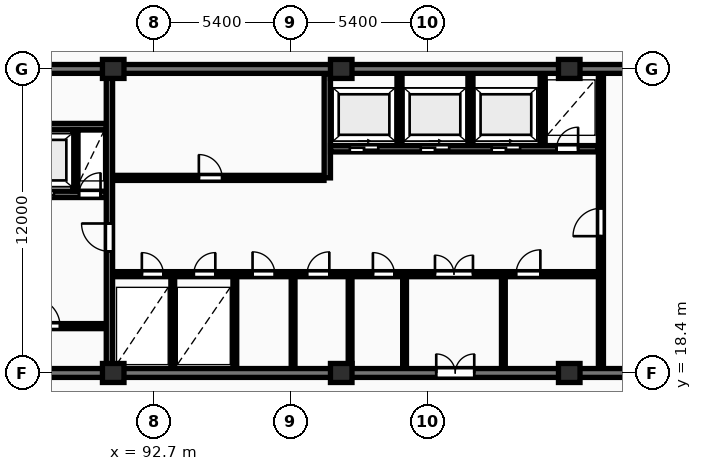
"""IFC4 building model, lengths in metres.
Left out: names, types, materials, properties, quantities, classifications, styles, units other than length and angle.
Written with IfcOpenShell. Run it as: python <this file> out.ifc"""

import sys

from ifc_helpers import new_model, si_unit, direction, frame, frame_2d, origin, origin_2d, place, context, subcontext, project, spatial, rectangle, extrude, element, fill, save


model = new_model("IFC4")
c1 = context("Model", 3, precision=1e-05, world=origin(), true_north=direction((0.0, 1.0)))
c2 = subcontext(c1, "Body", "Model", "MODEL_VIEW")
j1 = project(units=[si_unit("LENGTHUNIT", "METRE"), si_unit("PLANEANGLEUNIT", "RADIAN")], contexts=[c1])
p1 = place(None, origin())
s1 = spatial("IfcSite", under=j1, at=p1, CompositionType="ELEMENT")
p2 = place(p1, origin())
s2 = spatial("IfcBuilding", under=s1, at=p2, CompositionType="ELEMENT")
p3 = place(p2, frame((0.0, 0.0, 106.8)))
s3 = spatial("IfcBuildingStorey", under=s2, at=p3, CompositionType="ELEMENT", Elevation=106.8)
for number, where, z_axis, x_axis in (
    (1, (91.1, 18.4, 0.0), (0.0, 0.0, 1.0), (1.0, 0.0, 0.0)),
    (2, (91.1, 30.4, 0.0), (0.0, 0.0, 1.0), (1.0, 0.0, 0.0)),
    (3, (100.1, 18.4, 0.0), (0.0, 0.0, 1.0), (1.0, 0.0, 0.0)),
    (4, (100.1, 30.4, 0.0), (0.0, 0.0, 1.0), (1.0, 0.0, 0.0)),
    (5, (109.1, 18.4, 0.0), (0.0, 0.0, 1.0), (1.0, 0.0, 0.0)),
    (6, (109.1, 30.4, 0.0), (0.0, 0.0, 1.0), (1.0, 0.0, 0.0)),
):
    element("IfcColumn", number, at=place(p3, frame(where, z_axis=z_axis, x_axis=x_axis)), inside=s3, PredefinedType="COLUMN", context=c2, shape_type="SweptSolid", body=[
        extrude(rectangle(XDim=0.85, YDim=0.75, at=origin_2d()), origin(), (0.0, 0.0, 1.0), 3.25),
    ])
p4 = place(p3, frame((81.925, 30.4, 0.0), z_axis=(0.0, 0.0, 1.0), x_axis=(1.0, 0.0, 0.0)))
e7 = element("IfcWall", 7, at=p4, inside=s3, PredefinedType="SHEAR", context=c2, shape_type="SweptSolid", body=[
    extrude(rectangle(XDim=36.265, YDim=0.35, at=frame_2d((18.132, 0.0))), origin(), (0.0, 0.0, 1.0), 3.25),
])
p5 = place(p3, frame((81.925, 18.4, 0.0), z_axis=(0.0, 0.0, 1.0), x_axis=(1.0, 0.0, 0.0)))
e8 = element("IfcWall", 8, at=p5, inside=s3, PredefinedType="SHEAR", context=c2, shape_type="SweptSolid", body=[
    extrude(rectangle(XDim=36.265, YDim=0.35, at=frame_2d((18.132, 0.0))), origin(), (0.0, 0.0, 1.0), 3.25),
])
p6 = place(p5, frame((5.675, 0.0, 0.0)))
e9 = element("IfcOpeningElement", 9, at=p6, cuts=e8, PredefinedType="OPENING", context=c2, shape_type="SweptSolid", body=[
    extrude(rectangle(XDim=1.0, YDim=2.15, at=frame_2d((0.5, 1.075))), frame((0.0, 0.185, 0.0), z_axis=(0.0, -1.0, 0.0), x_axis=(1.0, 0.0, 0.0)), (0.0, 0.0, 1.0), 0.37),
])
p7 = place(p5, frame((21.925, 0.0, 0.0)))
e10 = element("IfcOpeningElement", 10, at=p7, cuts=e8, PredefinedType="OPENING", context=c2, shape_type="SweptSolid", body=[
    extrude(rectangle(XDim=1.5, YDim=2.2, at=frame_2d((0.75, 1.1))), frame((0.0, 0.185, 0.0), z_axis=(0.0, -1.0, 0.0), x_axis=(1.0, 0.0, 0.0)), (0.0, 0.0, 1.0), 0.37),
])
p8 = place(p5, frame((29.875, 0.0, 0.0)))
e11 = element("IfcOpeningElement", 11, at=p8, cuts=e8, PredefinedType="OPENING", context=c2, shape_type="SweptSolid", body=[
    extrude(rectangle(XDim=1.0, YDim=2.15, at=frame_2d((0.5, 1.075))), frame((0.0, 0.185, 0.0), z_axis=(0.0, -1.0, 0.0), x_axis=(1.0, 0.0, 0.0)), (0.0, 0.0, 1.0), 0.37),
])
p9 = place(p3, frame((83.0, 28.125, 0.0), z_axis=(0.0, 0.0, 1.0), x_axis=(1.0, 0.0, 0.0)))
e12 = element("IfcWall", 12, at=p9, inside=s3, PredefinedType="SHEAR", context=c2, shape_type="SweptSolid", body=[
    extrude(rectangle(XDim=7.82, YDim=0.25, at=frame_2d((3.91, 0.0))), origin(), (0.0, 0.0, 1.0), 3.25),
])
p10 = place(p3, frame((86.5, 25.45, 0.0), z_axis=(0.0, 0.0, 1.0), x_axis=(1.0, 0.0, 0.0)))
e13 = element("IfcWall", 13, at=p10, inside=s3, PredefinedType="SHEAR", context=c2, shape_type="SweptSolid", body=[
    extrude(rectangle(XDim=4.32, YDim=0.25, at=frame_2d((2.16, 0.0))), origin(), (0.0, 0.0, 1.0), 3.25),
])
p11 = place(p10, frame((1.14, 0.0, 0.0)))
e14 = element("IfcOpeningElement", 14, at=p11, cuts=e13, PredefinedType="OPENING", context=c2, shape_type="SweptSolid", body=[
    extrude(rectangle(XDim=1.12, YDim=2.12, at=frame_2d((0.56, 1.06))), frame((0.0, 0.135, 0.0), z_axis=(0.0, -1.0, 0.0), x_axis=(1.0, 0.0, 0.0)), (0.0, 0.0, 1.0), 0.27),
])
p12 = place(p10, frame((3.25, 0.0, 0.0)))
e15 = element("IfcOpeningElement", 15, at=p12, cuts=e13, PredefinedType="OPENING", context=c2, shape_type="SweptSolid", body=[
    extrude(rectangle(XDim=0.85, YDim=2.05, at=frame_2d((0.425, 1.025))), frame((0.0, 0.135, 0.0), z_axis=(0.0, -1.0, 0.0), x_axis=(1.0, 0.0, 0.0)), (0.0, 0.0, 1.0), 0.27),
])
p13 = place(p3, frame((89.6, 25.58, 0.0), z_axis=(0.0, 0.0, 1.0), x_axis=(0.0, 1.0, 0.0)))
e16 = element("IfcWall", 16, at=p13, inside=s3, PredefinedType="PARTITIONING", context=c2, shape_type="SweptSolid", body=[
    extrude(rectangle(XDim=2.42, YDim=0.2, at=frame_2d((1.21, 0.0))), origin(), (0.0, 0.0, 1.0), 2.97),
])
p14 = place(p3, frame((86.5, 20.25, 0.0), z_axis=(0.0, 0.0, 1.0), x_axis=(1.0, 0.0, 0.0)))
e17 = element("IfcWall", 17, at=p14, inside=s3, PredefinedType="PARTITIONING", context=c2, shape_type="SweptSolid", body=[
    extrude(rectangle(XDim=4.32, YDim=0.2, at=frame_2d((2.16, 0.0))), origin(), (0.0, 0.0, 1.0), 2.97),
])
p15 = place(p14, frame((1.4, 0.0, 0.0)))
e18 = element("IfcOpeningElement", 18, at=p15, cuts=e17, PredefinedType="OPENING", context=c2, shape_type="SweptSolid", body=[
    extrude(rectangle(XDim=1.1, YDim=2.1, at=frame_2d((0.55, 1.05))), frame((0.0, 0.11, 0.0), z_axis=(0.0, -1.0, 0.0), x_axis=(1.0, 0.0, 0.0)), (0.0, 0.0, 1.0), 0.22),
])
p16 = place(p3, frame((90.95, 18.6, 0.0), z_axis=(0.0, 0.0, 1.0), x_axis=(0.0, 1.0, 0.0)))
e19 = element("IfcWall", 19, at=p16, inside=s3, PredefinedType="SHEAR", context=c2, shape_type="SweptSolid", body=[
    extrude(rectangle(XDim=11.6, YDim=0.25, at=frame_2d((5.8, 0.0))), origin(), (0.0, 0.0, 1.0), 3.25),
])
p17 = place(p16, frame((4.6, 0.0, 0.0)))
e20 = element("IfcOpeningElement", 20, at=p17, cuts=e19, PredefinedType="OPENING", context=c2, shape_type="SweptSolid", body=[
    extrude(rectangle(XDim=1.1, YDim=2.1, at=frame_2d((0.55, 1.05))), frame((0.0, 0.135, 0.0), z_axis=(0.0, -1.0, 0.0), x_axis=(1.0, 0.0, 0.0)), (0.0, 0.0, 1.0), 0.27),
])
p18 = place(p3, frame((91.08, 26.1, 0.0), z_axis=(0.0, 0.0, 1.0), x_axis=(1.0, 0.0, 0.0)))
e21 = element("IfcWall", 21, at=p18, inside=s3, PredefinedType="PARTITIONING", context=c2, shape_type="SweptSolid", body=[
    extrude(rectangle(XDim=8.34, YDim=0.2, at=frame_2d((4.17, 0.0))), origin(), (0.0, 0.0, 1.0), 2.97),
])
p19 = place(p18, frame((3.4, 0.0, 0.0)))
e22 = element("IfcOpeningElement", 22, at=p19, cuts=e21, PredefinedType="OPENING", context=c2, shape_type="SweptSolid", body=[
    extrude(rectangle(XDim=0.92, YDim=2.08, at=frame_2d((0.46, 1.04))), frame((0.0, 0.11, 0.0), z_axis=(0.0, -1.0, 0.0), x_axis=(1.0, 0.0, 0.0)), (0.0, 0.0, 1.0), 0.22),
])
p20 = place(p3, frame((99.55, 26.1, 0.0), z_axis=(0.0, 0.0, 1.0), x_axis=(0.0, 1.0, 0.0)))
e23 = element("IfcWall", 23, at=p20, inside=s3, PredefinedType="SHEAR", context=c2, shape_type="SweptSolid", body=[
    extrude(rectangle(XDim=4.1, YDim=0.25, at=frame_2d((2.05, 0.0))), origin(), (0.0, 0.0, 1.0), 3.25),
])
for number, where, z_axis, x_axis in (
    (24, (102.4, 27.38, 0.0), (0.0, 0.0, 1.0), (0.0, 1.0, 0.0)),
    (25, (105.2, 27.38, 0.0), (0.0, 0.0, 1.0), (0.0, 1.0, 0.0)),
    (26, (108.05, 27.38, 0.0), (0.0, 0.0, 1.0), (0.0, 1.0, 0.0)),
):
    element("IfcWall", number, at=place(p3, frame(where, z_axis=z_axis, x_axis=x_axis)), inside=s3, PredefinedType="PARTITIONING", context=c2, shape_type="SweptSolid", body=[
        extrude(rectangle(XDim=2.82, YDim=0.2, at=frame_2d((1.41, 0.0))), origin(), (0.0, 0.0, 1.0), 2.97),
    ])
p21 = place(p3, frame((99.68, 27.25, 0.0), z_axis=(0.0, 0.0, 1.0), x_axis=(1.0, 0.0, 0.0)))
e27 = element("IfcWall", 27, at=p21, inside=s3, PredefinedType="SHEAR", context=c2, shape_type="SweptSolid", body=[
    extrude(rectangle(XDim=10.54, YDim=0.25, at=frame_2d((5.27, 0.0))), origin(), (0.0, 0.0, 1.0), 3.25),
])
p22 = place(p21, frame((0.76, 0.0, 0.0)))
e28 = element("IfcOpeningElement", 28, at=p22, cuts=e27, PredefinedType="OPENING", context=c2, shape_type="SweptSolid", body=[
    extrude(rectangle(XDim=1.12, YDim=2.12, at=frame_2d((0.56, 1.06))), frame((0.0, 0.135, 0.0), z_axis=(0.0, -1.0, 0.0), x_axis=(1.0, 0.0, 0.0)), (0.0, 0.0, 1.0), 0.27),
])
p23 = place(p21, frame((3.56, 0.0, 0.0)))
e29 = element("IfcOpeningElement", 29, at=p23, cuts=e27, PredefinedType="OPENING", context=c2, shape_type="SweptSolid", body=[
    extrude(rectangle(XDim=1.12, YDim=2.12, at=frame_2d((0.56, 1.06))), frame((0.0, 0.135, 0.0), z_axis=(0.0, -1.0, 0.0), x_axis=(1.0, 0.0, 0.0)), (0.0, 0.0, 1.0), 0.27),
])
p24 = place(p21, frame((6.36, 0.0, 0.0)))
e30 = element("IfcOpeningElement", 30, at=p24, cuts=e27, PredefinedType="OPENING", context=c2, shape_type="SweptSolid", body=[
    extrude(rectangle(XDim=1.12, YDim=2.12, at=frame_2d((0.56, 1.06))), frame((0.0, 0.135, 0.0), z_axis=(0.0, -1.0, 0.0), x_axis=(1.0, 0.0, 0.0)), (0.0, 0.0, 1.0), 0.27),
])
p25 = place(p21, frame((8.92, 0.0, 0.0)))
e31 = element("IfcOpeningElement", 31, at=p25, cuts=e27, PredefinedType="OPENING", context=c2, shape_type="SweptSolid", body=[
    extrude(rectangle(XDim=0.85, YDim=2.05, at=frame_2d((0.425, 1.025))), frame((0.0, 0.135, 0.0), z_axis=(0.0, -1.0, 0.0), x_axis=(1.0, 0.0, 0.0)), (0.0, 0.0, 1.0), 0.27),
])
for number, where, z_axis, x_axis in (
    (32, (93.45, 18.6, 0.0), (0.0, 0.0, 1.0), (0.0, 1.0, 0.0)),
    (33, (95.9, 18.6, 0.0), (0.0, 0.0, 1.0), (0.0, 1.0, 0.0)),
    (34, (98.2, 18.6, 0.0), (0.0, 0.0, 1.0), (0.0, 1.0, 0.0)),
    (35, (100.45, 18.6, 0.0), (0.0, 0.0, 1.0), (0.0, 1.0, 0.0)),
    (36, (102.6, 18.6, 0.0), (0.0, 0.0, 1.0), (0.0, 1.0, 0.0)),
    (37, (106.5, 18.6, 0.0), (0.0, 0.0, 1.0), (0.0, 1.0, 0.0)),
):
    element("IfcWall", number, at=place(p3, frame(where, z_axis=z_axis, x_axis=x_axis)), inside=s3, PredefinedType="PARTITIONING", context=c2, shape_type="SweptSolid", body=[
        extrude(rectangle(XDim=3.6, YDim=0.15, at=frame_2d((1.8, 0.0))), origin(), (0.0, 0.0, 1.0), 2.97),
    ])
p26 = place(p3, frame((91.08, 22.3, 0.0), z_axis=(0.0, 0.0, 1.0), x_axis=(1.0, 0.0, 0.0)))
e38 = element("IfcWall", 38, at=p26, inside=s3, PredefinedType="PARTITIONING", context=c2, shape_type="SweptSolid", body=[
    extrude(rectangle(XDim=19.14, YDim=0.2, at=frame_2d((9.57, 0.0))), origin(), (0.0, 0.0, 1.0), 2.97),
])
p27 = place(p26, frame((1.15, 0.0, 0.0)))
e39 = element("IfcOpeningElement", 39, at=p27, cuts=e38, PredefinedType="OPENING", context=c2, shape_type="SweptSolid", body=[
    extrude(rectangle(XDim=0.85, YDim=2.05, at=frame_2d((0.425, 1.025))), frame((0.0, 0.11, 0.0), z_axis=(0.0, -1.0, 0.0), x_axis=(1.0, 0.0, 0.0)), (0.0, 0.0, 1.0), 0.22),
])
p28 = place(p26, frame((3.2, 0.0, 0.0)))
e40 = element("IfcOpeningElement", 40, at=p28, cuts=e38, PredefinedType="OPENING", context=c2, shape_type="SweptSolid", body=[
    extrude(rectangle(XDim=0.85, YDim=2.05, at=frame_2d((0.425, 1.025))), frame((0.0, 0.11, 0.0), z_axis=(0.0, -1.0, 0.0), x_axis=(1.0, 0.0, 0.0)), (0.0, 0.0, 1.0), 0.22),
])
p29 = place(p26, frame((12.72, 0.0, 0.0)))
e41 = element("IfcOpeningElement", 41, at=p29, cuts=e38, PredefinedType="OPENING", context=c2, shape_type="SweptSolid", body=[
    extrude(rectangle(XDim=1.5, YDim=2.2, at=frame_2d((0.75, 1.1))), frame((0.0, 0.11, 0.0), z_axis=(0.0, -1.0, 0.0), x_axis=(1.0, 0.0, 0.0)), (0.0, 0.0, 1.0), 0.22),
])
p30 = place(p26, frame((5.52, 0.0, 0.0)))
e42 = element("IfcOpeningElement", 42, at=p30, cuts=e38, PredefinedType="OPENING", context=c2, shape_type="SweptSolid", body=[
    extrude(rectangle(XDim=0.88, YDim=2.06, at=frame_2d((0.44, 1.03))), frame((0.0, 0.11, 0.0), z_axis=(0.0, -1.0, 0.0), x_axis=(1.0, 0.0, 0.0)), (0.0, 0.0, 1.0), 0.22),
])
p31 = place(p26, frame((7.67, 0.0, 0.0)))
e43 = element("IfcOpeningElement", 43, at=p31, cuts=e38, PredefinedType="OPENING", context=c2, shape_type="SweptSolid", body=[
    extrude(rectangle(XDim=0.88, YDim=2.06, at=frame_2d((0.44, 1.03))), frame((0.0, 0.11, 0.0), z_axis=(0.0, -1.0, 0.0), x_axis=(1.0, 0.0, 0.0)), (0.0, 0.0, 1.0), 0.22),
])
p32 = place(p26, frame((10.27, 0.0, 0.0)))
e44 = element("IfcOpeningElement", 44, at=p32, cuts=e38, PredefinedType="OPENING", context=c2, shape_type="SweptSolid", body=[
    extrude(rectangle(XDim=0.85, YDim=2.05, at=frame_2d((0.425, 1.025))), frame((0.0, 0.11, 0.0), z_axis=(0.0, -1.0, 0.0), x_axis=(1.0, 0.0, 0.0)), (0.0, 0.0, 1.0), 0.22),
])
p33 = place(p26, frame((15.92, 0.0, 0.0)))
e45 = element("IfcOpeningElement", 45, at=p33, cuts=e38, PredefinedType="OPENING", context=c2, shape_type="SweptSolid", body=[
    extrude(rectangle(XDim=0.96, YDim=2.1, at=frame_2d((0.48, 1.05))), frame((0.0, 0.11, 0.0), z_axis=(0.0, -1.0, 0.0), x_axis=(1.0, 0.0, 0.0)), (0.0, 0.0, 1.0), 0.22),
])
p34 = place(p3, frame((110.35, 18.6, 0.0), z_axis=(0.0, 0.0, 1.0), x_axis=(0.0, 1.0, 0.0)))
e46 = element("IfcWall", 46, at=p34, inside=s3, PredefinedType="PARTITIONING", context=c2, shape_type="SweptSolid", body=[
    extrude(rectangle(XDim=11.6, YDim=0.2, at=frame_2d((5.8, 0.0))), origin(), (0.0, 0.0, 1.0), 2.97),
])
p35 = place(p34, frame((5.2, 0.0, 0.0)))
e47 = element("IfcOpeningElement", 47, at=p35, cuts=e46, PredefinedType="OPENING", context=c2, shape_type="SweptSolid", body=[
    extrude(rectangle(XDim=1.1, YDim=2.15, at=frame_2d((0.55, 1.075))), frame((0.0, 0.11, 0.0), z_axis=(0.0, -1.0, 0.0), x_axis=(1.0, 0.0, 0.0)), (0.0, 0.0, 1.0), 0.22),
])
p36 = place(p7, origin())
e48 = element("IfcDoor", 48, at=p36, inside=s3, OperationType="DOUBLE_DOOR_SINGLE_SWING", PredefinedType="DOOR", context=c2, shape_type="SweptSolid", body=[
    extrude(rectangle(XDim=1.5, YDim=2.2, at=frame_2d((0.75, 1.1))), frame((0.0, 0.025, 0.0), z_axis=(0.0, -1.0, 0.0), x_axis=(1.0, 0.0, 0.0)), (0.0, 0.0, 1.0), 0.05),
])
fill(e10, e48)
p37 = place(p11, origin())
e49 = element("IfcDoor", 49, at=p37, inside=s3, OperationType="SLIDING_TO_RIGHT", PredefinedType="DOOR", context=c2, shape_type="SweptSolid", body=[
    extrude(rectangle(XDim=1.12, YDim=2.12, at=frame_2d((0.56, 1.06))), frame((0.0, 0.025, 0.0), z_axis=(0.0, -1.0, 0.0), x_axis=(1.0, 0.0, 0.0)), (0.0, 0.0, 1.0), 0.05),
])
fill(e14, e49)
p38 = place(p12, origin())
e50 = element("IfcDoor", 50, at=p38, inside=s3, OperationType="SINGLE_SWING_RIGHT", PredefinedType="DOOR", context=c2, shape_type="SweptSolid", body=[
    extrude(rectangle(XDim=0.85, YDim=2.05, at=frame_2d((0.425, 1.025))), frame((0.0, 0.025, 0.0), z_axis=(0.0, -1.0, 0.0), x_axis=(1.0, 0.0, 0.0)), (0.0, 0.0, 1.0), 0.05),
])
fill(e15, e50)
p39 = place(p15, origin())
e51 = element("IfcDoor", 51, at=p39, inside=s3, OperationType="SINGLE_SWING_LEFT", PredefinedType="DOOR", context=c2, shape_type="SweptSolid", body=[
    extrude(rectangle(XDim=1.1, YDim=2.1, at=frame_2d((0.55, 1.05))), frame((0.0, 0.025, 0.0), z_axis=(0.0, -1.0, 0.0), x_axis=(1.0, 0.0, 0.0)), (0.0, 0.0, 1.0), 0.05),
])
fill(e18, e51)
p40 = place(p17, origin())
e52 = element("IfcDoor", 52, at=p40, inside=s3, OperationType="SINGLE_SWING_RIGHT", PredefinedType="DOOR", context=c2, shape_type="SweptSolid", body=[
    extrude(rectangle(XDim=1.1, YDim=2.1, at=frame_2d((0.55, 1.05))), frame((0.0, 0.025, 0.0), z_axis=(0.0, -1.0, 0.0), x_axis=(1.0, 0.0, 0.0)), (0.0, 0.0, 1.0), 0.05),
])
fill(e20, e52)
p41 = place(p19, origin())
e53 = element("IfcDoor", 53, at=p41, inside=s3, OperationType="SINGLE_SWING_LEFT", PredefinedType="DOOR", context=c2, shape_type="SweptSolid", body=[
    extrude(rectangle(XDim=0.92, YDim=2.08, at=frame_2d((0.46, 1.04))), frame((0.0, 0.025, 0.0), z_axis=(0.0, -1.0, 0.0), x_axis=(1.0, 0.0, 0.0)), (0.0, 0.0, 1.0), 0.05),
])
fill(e22, e53)
p42 = place(p22, origin())
e54 = element("IfcDoor", 54, at=p42, inside=s3, OperationType="SLIDING_TO_RIGHT", PredefinedType="DOOR", context=c2, shape_type="SweptSolid", body=[
    extrude(rectangle(XDim=1.12, YDim=2.12, at=frame_2d((0.56, 1.06))), frame((0.0, 0.025, 0.0), z_axis=(0.0, -1.0, 0.0), x_axis=(1.0, 0.0, 0.0)), (0.0, 0.0, 1.0), 0.05),
])
fill(e28, e54)
p43 = place(p23, origin())
e55 = element("IfcDoor", 55, at=p43, inside=s3, OperationType="SLIDING_TO_RIGHT", PredefinedType="DOOR", context=c2, shape_type="SweptSolid", body=[
    extrude(rectangle(XDim=1.12, YDim=2.12, at=frame_2d((0.56, 1.06))), frame((0.0, 0.025, 0.0), z_axis=(0.0, -1.0, 0.0), x_axis=(1.0, 0.0, 0.0)), (0.0, 0.0, 1.0), 0.05),
])
fill(e29, e55)
p44 = place(p24, origin())
e56 = element("IfcDoor", 56, at=p44, inside=s3, OperationType="SLIDING_TO_RIGHT", PredefinedType="DOOR", context=c2, shape_type="SweptSolid", body=[
    extrude(rectangle(XDim=1.12, YDim=2.12, at=frame_2d((0.56, 1.06))), frame((0.0, 0.025, 0.0), z_axis=(0.0, -1.0, 0.0), x_axis=(1.0, 0.0, 0.0)), (0.0, 0.0, 1.0), 0.05),
])
fill(e30, e56)
p45 = place(p25, origin())
e57 = element("IfcDoor", 57, at=p45, inside=s3, OperationType="SINGLE_SWING_RIGHT", PredefinedType="DOOR", context=c2, shape_type="SweptSolid", body=[
    extrude(rectangle(XDim=0.85, YDim=2.05, at=frame_2d((0.425, 1.025))), frame((0.0, 0.025, 0.0), z_axis=(0.0, -1.0, 0.0), x_axis=(1.0, 0.0, 0.0)), (0.0, 0.0, 1.0), 0.05),
])
fill(e31, e57)
p46 = place(p27, origin())
e58 = element("IfcDoor", 58, at=p46, inside=s3, OperationType="SINGLE_SWING_LEFT", PredefinedType="DOOR", context=c2, shape_type="SweptSolid", body=[
    extrude(rectangle(XDim=0.85, YDim=2.05, at=frame_2d((0.425, 1.025))), frame((0.0, 0.025, 0.0), z_axis=(0.0, -1.0, 0.0), x_axis=(1.0, 0.0, 0.0)), (0.0, 0.0, 1.0), 0.05),
])
fill(e39, e58)
p47 = place(p28, origin())
e59 = element("IfcDoor", 59, at=p47, inside=s3, OperationType="SINGLE_SWING_RIGHT", PredefinedType="DOOR", context=c2, shape_type="SweptSolid", body=[
    extrude(rectangle(XDim=0.85, YDim=2.05, at=frame_2d((0.425, 1.025))), frame((0.0, 0.025, 0.0), z_axis=(0.0, -1.0, 0.0), x_axis=(1.0, 0.0, 0.0)), (0.0, 0.0, 1.0), 0.05),
])
fill(e40, e59)
p48 = place(p29, origin())
e60 = element("IfcDoor", 60, at=p48, inside=s3, OperationType="DOUBLE_DOOR_SINGLE_SWING", PredefinedType="DOOR", context=c2, shape_type="SweptSolid", body=[
    extrude(rectangle(XDim=1.5, YDim=2.2, at=frame_2d((0.75, 1.1))), frame((0.0, 0.025, 0.0), z_axis=(0.0, -1.0, 0.0), x_axis=(1.0, 0.0, 0.0)), (0.0, 0.0, 1.0), 0.05),
])
fill(e41, e60)
p49 = place(p30, origin())
e61 = element("IfcDoor", 61, at=p49, inside=s3, OperationType="SINGLE_SWING_LEFT", PredefinedType="DOOR", context=c2, shape_type="SweptSolid", body=[
    extrude(rectangle(XDim=0.88, YDim=2.06, at=frame_2d((0.44, 1.03))), frame((0.0, 0.025, 0.0), z_axis=(0.0, -1.0, 0.0), x_axis=(1.0, 0.0, 0.0)), (0.0, 0.0, 1.0), 0.05),
])
fill(e42, e61)
p50 = place(p31, origin())
e62 = element("IfcDoor", 62, at=p50, inside=s3, OperationType="SINGLE_SWING_RIGHT", PredefinedType="DOOR", context=c2, shape_type="SweptSolid", body=[
    extrude(rectangle(XDim=0.88, YDim=2.06, at=frame_2d((0.44, 1.03))), frame((0.0, 0.025, 0.0), z_axis=(0.0, -1.0, 0.0), x_axis=(1.0, 0.0, 0.0)), (0.0, 0.0, 1.0), 0.05),
])
fill(e43, e62)
p51 = place(p32, origin())
e63 = element("IfcDoor", 63, at=p51, inside=s3, OperationType="SINGLE_SWING_LEFT", PredefinedType="DOOR", context=c2, shape_type="SweptSolid", body=[
    extrude(rectangle(XDim=0.85, YDim=2.05, at=frame_2d((0.425, 1.025))), frame((0.0, 0.025, 0.0), z_axis=(0.0, -1.0, 0.0), x_axis=(1.0, 0.0, 0.0)), (0.0, 0.0, 1.0), 0.05),
])
fill(e44, e63)
p52 = place(p33, origin())
e64 = element("IfcDoor", 64, at=p52, inside=s3, OperationType="SINGLE_SWING_RIGHT", PredefinedType="DOOR", context=c2, shape_type="SweptSolid", body=[
    extrude(rectangle(XDim=0.96, YDim=2.1, at=frame_2d((0.48, 1.05))), frame((0.0, 0.025, 0.0), z_axis=(0.0, -1.0, 0.0), x_axis=(1.0, 0.0, 0.0)), (0.0, 0.0, 1.0), 0.05),
])
fill(e45, e64)
p53 = place(p35, origin())
e65 = element("IfcDoor", 65, at=p53, inside=s3, OperationType="SINGLE_SWING_LEFT", PredefinedType="DOOR", context=c2, shape_type="SweptSolid", body=[
    extrude(rectangle(XDim=1.1, YDim=2.15, at=frame_2d((0.55, 1.075))), frame((0.0, 0.025, 0.0), z_axis=(0.0, -1.0, 0.0), x_axis=(1.0, 0.0, 0.0)), (0.0, 0.0, 1.0), 0.05),
])
fill(e47, e65)
save(model, sys.argv[1])
